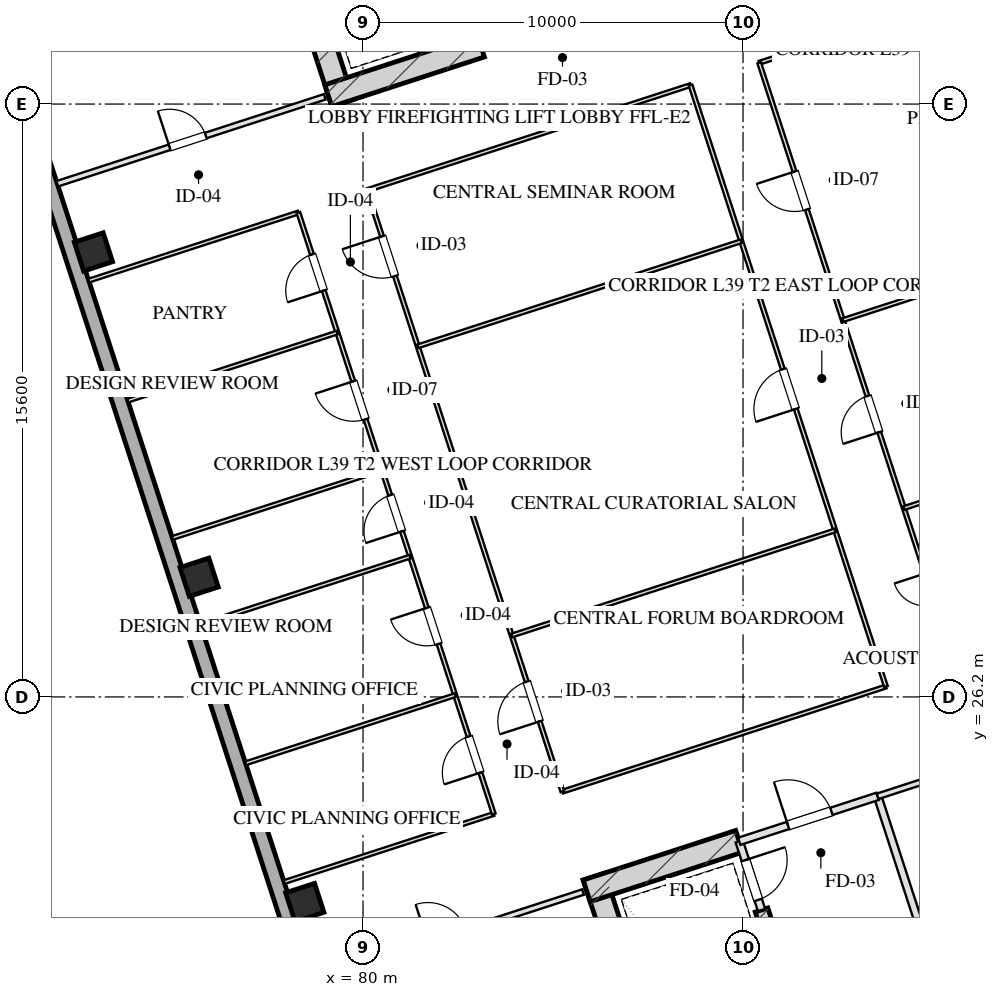
"""IFC4 building model, lengths in metres.
Left out: names, types, materials, properties, quantities, classifications, styles, units other than length and angle.
Written with IfcOpenShell. Run it as: python <this file> out.ifc"""

import sys

from ifc_helpers import new_model, si_unit, direction, frame, frame_2d, origin, origin_2d, place, context, subcontext, project, spatial, rectangle, hollow_rectangle, extrude, element, fill, save


model = new_model("IFC4")
c1 = context("Model", 3, precision=1e-05, world=origin(), true_north=direction((0.0, 1.0)))
c2 = subcontext(c1, "Body", "Model", "MODEL_VIEW")
j1 = project(units=[si_unit("LENGTHUNIT", "METRE"), si_unit("PLANEANGLEUNIT", "RADIAN")], contexts=[c1])
p1 = place(None, origin())
s1 = spatial("IfcSite", under=j1, at=p1, CompositionType="ELEMENT")
p2 = place(p1, origin())
s2 = spatial("IfcBuilding", under=s1, at=p2, CompositionType="ELEMENT")
p3 = place(p2, frame((0.0, 0.0, 149.5)))
s3 = spatial("IfcBuildingStorey", under=s2, at=p3, CompositionType="ELEMENT", Elevation=149.5)
p4 = place(p3, frame((86.078, 21.475, 0.0), z_axis=(0.0, 0.0, 1.0), x_axis=(0.309017938678, -0.951056209472, 0.0)))
e1 = element("IfcWall", 1, at=p4, inside=s3, PredefinedType="SHEAR", context=c2, shape_type="SweptSolid", body=[
    extrude(rectangle(XDim=9.48, YDim=0.6, at=frame_2d((4.74, 0.0))), origin(), (0.0, 0.0, 1.0), 3.45),
])
p5 = place(p3, frame((90.486, 20.594, 0.0), z_axis=(0.0, 0.0, 1.0), x_axis=(0.309020428229, -0.951055400562, 0.0)))
e2 = element("IfcWall", 2, at=p5, inside=s3, PredefinedType="SHEAR", context=c2, shape_type="SweptSolid", body=[
    extrude(rectangle(XDim=6.98, YDim=0.35, at=frame_2d((3.49, 0.0))), origin(), (0.0, 0.0, 1.0), 3.45),
])
p6 = place(p3, frame((85.886, 21.097, 0.0), z_axis=(0.0, 0.0, 1.0), x_axis=(0.951068073652, 0.308981422225, 0.0)))
e3 = element("IfcWall", 3, at=p6, inside=s3, PredefinedType="SHEAR", context=c2, shape_type="SweptSolid", body=[
    extrude(rectangle(XDim=4.22, YDim=0.6, at=frame_2d((2.11, 0.0))), origin(), (0.0, 0.0, 1.0), 3.45),
])
p7 = place(p3, frame((79.466, 41.828, 0.0), z_axis=(0.0, 0.0, 1.0), x_axis=(-0.309041232772, 0.951048640421, 0.0)))
e4 = element("IfcWall", 4, at=p7, inside=s3, PredefinedType="SHEAR", context=c2, shape_type="SweptSolid", body=[
    extrude(rectangle(XDim=9.48, YDim=0.6, at=frame_2d((4.74, 0.0))), origin(), (0.0, 0.0, 1.0), 3.45),
])
p8 = place(p3, frame((79.087, 42.021, 0.0), z_axis=(0.0, 0.0, 1.0), x_axis=(0.951062550203, 0.3089984233, 0.0)))
e5 = element("IfcWall", 5, at=p8, inside=s3, PredefinedType="SHEAR", context=c2, shape_type="SweptSolid", body=[
    extrude(rectangle(XDim=4.22, YDim=0.6, at=frame_2d((2.11, 0.0))), origin(), (0.0, 0.0, 1.0), 3.45),
])
for number, where, z_axis, x_axis in (
    (6, (78.468, 20.79, 0.0), (0.0, 0.0, 1.0), (0.951, 0.309, 0.0)),
    (7, (75.687, 29.349, 0.0), (0.0, 0.0, 1.0), (0.951, 0.309, 0.0)),
    (8, (72.906, 37.909, 0.0), (0.0, 0.0, 1.0), (0.951, 0.309, 0.0)),
):
    element("IfcColumn", number, at=place(p3, frame(where, z_axis=z_axis, x_axis=x_axis)), inside=s3, PredefinedType="COLUMN", context=c2, shape_type="SweptSolid", body=[
        extrude(hollow_rectangle(XDim=0.8, YDim=0.8, WallThickness=0.028, at=origin_2d()), origin(), (0.0, 0.0, 1.0), 3.451),
    ])
p9 = place(p3, frame((81.776, 8.827, 0.0), z_axis=(0.0, 0.0, 1.0), x_axis=(-0.309014228706, 0.951057414911, 0.0)))
e9 = element("IfcWall", 9, at=p9, inside=s3, PredefinedType="SOLIDWALL", context=c2, shape_type="SweptSolid", body=[
    extrude(rectangle(XDim=42.8, YDim=0.4, at=frame_2d((21.4, 0.0))), origin(), (0.0, 0.0, 1.0), 2.61),
])
p10 = place(p3, frame((89.899, 22.401, 0.0), z_axis=(0.0, 0.0, 1.0), x_axis=(0.308932062672, -0.951084108086, 0.0)))
e10 = element("IfcWall", 10, at=p10, inside=s3, PredefinedType="PARTITIONING", context=c2, shape_type="SweptSolid", body=[
    extrude(rectangle(XDim=1.9, YDim=0.2, at=frame_2d((0.95, 0.0))), origin(), (0.0, 0.0, 1.0), 3.175),
])
p11 = place(p10, frame((0.52, 0.0, 0.0)))
e11 = element("IfcOpeningElement", 11, at=p11, cuts=e10, PredefinedType="OPENING", context=c2, shape_type="SweptSolid", body=[
    extrude(rectangle(XDim=1.1, YDim=2.05, at=frame_2d((0.55, 1.025))), frame((0.0, 0.11, 0.0), z_axis=(0.0, -1.0, 0.0), x_axis=(1.0, 0.0, 0.0)), (0.0, 0.0, 1.0), 0.22),
])
p12 = place(p3, frame((93.542, 23.585, 0.0), z_axis=(0.0, 0.0, 1.0), x_axis=(0.309042196757, -0.951048327176, 0.0)))
e12 = element("IfcWall", 12, at=p12, inside=s3, PredefinedType="PARTITIONING", context=c2, shape_type="SweptSolid", body=[
    extrude(rectangle(XDim=8.43, YDim=0.2, at=frame_2d((4.215, 0.0))), origin(), (0.0, 0.0, 1.0), 3.175),
])
p13 = place(p3, frame((89.899, 22.401, 0.0), z_axis=(0.0, 0.0, 1.0), x_axis=(0.951046716504, 0.309047153403, 0.0)))
e13 = element("IfcWall", 13, at=p13, inside=s3, PredefinedType="PARTITIONING", context=c2, shape_type="SweptSolid", body=[
    extrude(rectangle(XDim=3.83, YDim=0.2, at=frame_2d((1.915, 0.0))), origin(), (0.0, 0.0, 1.0), 3.175),
])
p14 = place(p13, frame((1.35, 0.0, 0.0)))
e14 = element("IfcOpeningElement", 14, at=p14, cuts=e13, PredefinedType="OPENING", context=c2, shape_type="SweptSolid", body=[
    extrude(rectangle(XDim=1.2, YDim=2.05, at=frame_2d((0.6, 1.025))), frame((0.0, 0.11, 0.0), z_axis=(0.0, -1.0, 0.0), x_axis=(1.0, 0.0, 0.0)), (0.0, 0.0, 1.0), 0.22),
])
p15 = place(p3, frame((93.542, 23.585, 0.0), z_axis=(0.0, 0.0, 1.0), x_axis=(0.951063829732, 0.308994485023, 0.0)))
e15 = element("IfcWall", 15, at=p15, inside=s3, PredefinedType="PARTITIONING", context=c2, shape_type="SweptSolid", body=[
    extrude(rectangle(XDim=4.4, YDim=0.15, at=frame_2d((2.2, 0.0))), origin(), (0.0, 0.0, 1.0), 3.175),
])
p16 = place(p15, frame((1.5, 0.0, 0.0)))
e16 = element("IfcOpeningElement", 16, at=p16, cuts=e15, PredefinedType="OPENING", context=c2, shape_type="SweptSolid", body=[
    extrude(rectangle(XDim=1.0, YDim=2.05, at=frame_2d((0.5, 1.025))), frame((0.0, 0.085, 0.0), z_axis=(0.0, -1.0, 0.0), x_axis=(1.0, 0.0, 0.0)), (0.0, 0.0, 1.0), 0.17),
])
p17 = place(p3, frame((78.753, 18.78, 0.0), z_axis=(0.0, 0.0, 1.0), x_axis=(0.951060977215, 0.309003264738, 0.0)))
e17 = element("IfcWall", 17, at=p17, inside=s3, PredefinedType="PARTITIONING", context=c2, shape_type="SweptSolid", body=[
    extrude(rectangle(XDim=7.4, YDim=0.15, at=frame_2d((3.7, 0.0))), origin(), (0.0, 0.0, 1.0), 3.175),
])
p18 = place(p17, frame((3.108, 0.0, 0.0)))
e18 = element("IfcOpeningElement", 18, at=p18, cuts=e17, PredefinedType="OPENING", context=c2, shape_type="SweptSolid", body=[
    extrude(rectangle(XDim=1.05, YDim=2.05, at=frame_2d((0.525, 1.025))), frame((0.0, 0.085, 0.0), z_axis=(0.0, -1.0, 0.0), x_axis=(1.0, 0.0, 0.0)), (0.0, 0.0, 1.0), 0.17),
])
p19 = place(p3, frame((71.955, 39.703, 0.0), z_axis=(0.0, 0.0, 1.0), x_axis=(0.951060977215, 0.309003264738, 0.0)))
e19 = element("IfcWall", 19, at=p19, inside=s3, PredefinedType="PARTITIONING", context=c2, shape_type="SweptSolid", body=[
    extrude(rectangle(XDim=7.4, YDim=0.15, at=frame_2d((3.7, 0.0))), origin(), (0.0, 0.0, 1.0), 3.175),
])
p20 = place(p19, frame((3.108, 0.0, 0.0)))
e20 = element("IfcOpeningElement", 20, at=p20, cuts=e19, PredefinedType="OPENING", context=c2, shape_type="SweptSolid", body=[
    extrude(rectangle(XDim=1.0, YDim=2.05, at=frame_2d((0.5, 1.025))), frame((0.0, 0.085, 0.0), z_axis=(0.0, -1.0, 0.0), x_axis=(1.0, 0.0, 0.0)), (0.0, 0.0, 1.0), 0.17),
])
p21 = place(p3, frame((77.925, 21.328, 0.0), z_axis=(0.0, 0.0, 1.0), x_axis=(0.951059431056, 0.309008023519, 0.0)))
e21 = element("IfcWall", 21, at=p21, inside=s3, PredefinedType="MOVABLE", context=c2, shape_type="SweptSolid", body=[
    extrude(rectangle(XDim=5.8, YDim=0.1, at=frame_2d((2.9, 0.0))), origin(), (0.0, 0.0, 1.0), 3.175),
])
p22 = place(p3, frame((85.248, 23.708, 0.0), z_axis=(0.0, 0.0, 1.0), x_axis=(0.951059123431, 0.309008970321, 0.0)))
e22 = element("IfcWall", 22, at=p22, inside=s3, PredefinedType="MOVABLE", context=c2, shape_type="SweptSolid", body=[
    extrude(rectangle(XDim=8.95, YDim=0.1, at=frame_2d((4.475, 0.0))), origin(), (0.0, 0.0, 1.0), 3.175),
])
p23 = place(p3, frame((72.783, 37.154, 0.0), z_axis=(0.0, 0.0, 1.0), x_axis=(0.951047059821, 0.309046096893, 0.0)))
e23 = element("IfcWall", 23, at=p23, inside=s3, PredefinedType="MOVABLE", context=c2, shape_type="SweptSolid", body=[
    extrude(rectangle(XDim=5.8, YDim=0.1, at=frame_2d((2.9, 0.0))), origin(), (0.0, 0.0, 1.0), 3.175),
])
p24 = place(p3, frame((80.106, 39.533, 0.0), z_axis=(0.0, 0.0, 1.0), x_axis=(0.951059123431, 0.309008970321, 0.0)))
e24 = element("IfcWall", 24, at=p24, inside=s3, PredefinedType="MOVABLE", context=c2, shape_type="SweptSolid", body=[
    extrude(rectangle(XDim=8.95, YDim=0.1, at=frame_2d((4.475, 0.0))), origin(), (0.0, 0.0, 1.0), 3.175),
])
p25 = place(p3, frame((90.425, 42.886, 0.0), z_axis=(0.0, 0.0, 1.0), x_axis=(0.95105749975, 0.309013967595, 0.0)))
e25 = element("IfcWall", 25, at=p25, inside=s3, PredefinedType="MOVABLE", context=c2, shape_type="SweptSolid", body=[
    extrude(rectangle(XDim=12.25, YDim=0.1, at=frame_2d((6.125, 0.0))), origin(), (0.0, 0.0, 1.0), 3.175),
])
p26 = place(p3, frame((83.441, 23.121, 0.0), z_axis=(0.0, 0.0, 1.0), x_axis=(-0.30901773025, 0.951056277195, 0.0)))
e26 = element("IfcWall", 26, at=p26, inside=s3, PredefinedType="MOVABLE", context=c2, shape_type="SweptSolid", body=[
    extrude(rectangle(XDim=16.64, YDim=0.1, at=frame_2d((8.32, 0.0))), origin(), (0.0, 0.0, 1.0), 3.175),
])
p27 = place(p26, frame((1.143, 0.0, 0.0)))
e27 = element("IfcOpeningElement", 27, at=p27, cuts=e26, PredefinedType="OPENING", context=c2, shape_type="SweptSolid", body=[
    extrude(rectangle(XDim=1.0, YDim=2.05, at=frame_2d((0.5, 1.025))), frame((0.0, 0.06, 0.0), z_axis=(0.0, -1.0, 0.0), x_axis=(1.0, 0.0, 0.0)), (0.0, 0.0, 1.0), 0.12),
])
p28 = place(p26, frame((4.703, 0.0, 0.0)))
e28 = element("IfcOpeningElement", 28, at=p28, cuts=e26, PredefinedType="OPENING", context=c2, shape_type="SweptSolid", body=[
    extrude(rectangle(XDim=1.0, YDim=2.05, at=frame_2d((0.5, 1.025))), frame((0.0, 0.06, 0.0), z_axis=(0.0, -1.0, 0.0), x_axis=(1.0, 0.0, 0.0)), (0.0, 0.0, 1.0), 0.12),
])
p29 = place(p26, frame((7.82, 0.0, 0.0)))
e29 = element("IfcOpeningElement", 29, at=p29, cuts=e26, PredefinedType="OPENING", context=c2, shape_type="SweptSolid", body=[
    extrude(rectangle(XDim=1.0, YDim=2.05, at=frame_2d((0.5, 1.025))), frame((0.0, 0.06, 0.0), z_axis=(0.0, -1.0, 0.0), x_axis=(1.0, 0.0, 0.0)), (0.0, 0.0, 1.0), 0.12),
])
p30 = place(p26, frame((10.92, 0.0, 0.0)))
e30 = element("IfcOpeningElement", 30, at=p30, cuts=e26, PredefinedType="OPENING", context=c2, shape_type="SweptSolid", body=[
    extrude(rectangle(XDim=1.05, YDim=2.05, at=frame_2d((0.525, 1.025))), frame((0.0, 0.06, 0.0), z_axis=(0.0, -1.0, 0.0), x_axis=(1.0, 0.0, 0.0)), (0.0, 0.0, 1.0), 0.12),
])
p31 = place(p26, frame((14.48, 0.0, 0.0)))
e31 = element("IfcOpeningElement", 31, at=p31, cuts=e26, PredefinedType="OPENING", context=c2, shape_type="SweptSolid", body=[
    extrude(rectangle(XDim=1.0, YDim=2.05, at=frame_2d((0.5, 1.025))), frame((0.0, 0.06, 0.0), z_axis=(0.0, -1.0, 0.0), x_axis=(1.0, 0.0, 0.0)), (0.0, 0.0, 1.0), 0.12),
])
p32 = place(p3, frame((85.248, 23.708, 0.0), z_axis=(0.0, 0.0, 1.0), x_axis=(-0.309004459387, 0.951060589068, 0.0)))
e32 = element("IfcWall", 32, at=p32, inside=s3, PredefinedType="MOVABLE", context=c2, shape_type="SweptSolid", body=[
    extrude(rectangle(XDim=16.64, YDim=0.1, at=frame_2d((8.32, 0.0))), origin(), (0.0, 0.0, 1.0), 3.175),
])
p33 = place(p32, frame((1.944, 0.0, 0.0)))
e33 = element("IfcOpeningElement", 33, at=p33, cuts=e32, PredefinedType="OPENING", context=c2, shape_type="SweptSolid", body=[
    extrude(rectangle(XDim=1.1, YDim=2.05, at=frame_2d((0.55, 1.025))), frame((0.0, 0.06, 0.0), z_axis=(0.0, -1.0, 0.0), x_axis=(1.0, 0.0, 0.0)), (0.0, 0.0, 1.0), 0.12),
])
p34 = place(p32, frame((14.264, 0.0, 0.0)))
e34 = element("IfcOpeningElement", 34, at=p34, cuts=e32, PredefinedType="OPENING", context=c2, shape_type="SweptSolid", body=[
    extrude(rectangle(XDim=1.1, YDim=2.05, at=frame_2d((0.55, 1.025))), frame((0.0, 0.06, 0.0), z_axis=(0.0, -1.0, 0.0), x_axis=(1.0, 0.0, 0.0)), (0.0, 0.0, 1.0), 0.12),
])
p35 = place(p3, frame((93.76, 26.473, 0.0), z_axis=(0.0, 0.0, 1.0), x_axis=(-0.309004459387, 0.951060589068, 0.0)))
e35 = element("IfcWall", 35, at=p35, inside=s3, PredefinedType="MOVABLE", context=c2, shape_type="SweptSolid", body=[
    extrude(rectangle(XDim=16.64, YDim=0.1, at=frame_2d((8.32, 0.0))), origin(), (0.0, 0.0, 1.0), 3.175),
])
p36 = place(p35, frame((7.68, 0.0, 0.0)))
e36 = element("IfcOpeningElement", 36, at=p36, cuts=e35, PredefinedType="OPENING", context=c2, shape_type="SweptSolid", body=[
    extrude(rectangle(XDim=1.1, YDim=2.05, at=frame_2d((0.55, 1.025))), frame((0.0, 0.06, 0.0), z_axis=(0.0, -1.0, 0.0), x_axis=(1.0, 0.0, 0.0)), (0.0, 0.0, 1.0), 0.12),
])
p37 = place(p3, frame((95.567, 27.061, 0.0), z_axis=(0.0, 0.0, 1.0), x_axis=(-0.30901773025, 0.951056277195, 0.0)))
e37 = element("IfcWall", 37, at=p37, inside=s3, PredefinedType="MOVABLE", context=c2, shape_type="SweptSolid", body=[
    extrude(rectangle(XDim=16.64, YDim=0.1, at=frame_2d((8.32, 0.0))), origin(), (0.0, 0.0, 1.0), 3.175),
])
p38 = place(p37, frame((1.66, 0.0, 0.0)))
e38 = element("IfcOpeningElement", 38, at=p38, cuts=e37, PredefinedType="OPENING", context=c2, shape_type="SweptSolid", body=[
    extrude(rectangle(XDim=0.85, YDim=2.05, at=frame_2d((0.425, 1.025))), frame((0.0, 0.06, 0.0), z_axis=(0.0, -1.0, 0.0), x_axis=(1.0, 0.0, 0.0)), (0.0, 0.0, 1.0), 0.12),
])
p39 = place(p37, frame((6.42, 0.0, 0.0)))
e39 = element("IfcOpeningElement", 39, at=p39, cuts=e37, PredefinedType="OPENING", context=c2, shape_type="SweptSolid", body=[
    extrude(rectangle(XDim=1.0, YDim=2.05, at=frame_2d((0.5, 1.025))), frame((0.0, 0.06, 0.0), z_axis=(0.0, -1.0, 0.0), x_axis=(1.0, 0.0, 0.0)), (0.0, 0.0, 1.0), 0.12),
])
p40 = place(p37, frame((12.58, 0.0, 0.0)))
e40 = element("IfcOpeningElement", 40, at=p40, cuts=e37, PredefinedType="OPENING", context=c2, shape_type="SweptSolid", body=[
    extrude(rectangle(XDim=1.05, YDim=2.05, at=frame_2d((0.525, 1.025))), frame((0.0, 0.06, 0.0), z_axis=(0.0, -1.0, 0.0), x_axis=(1.0, 0.0, 0.0)), (0.0, 0.0, 1.0), 0.12),
])
p41 = place(p3, frame((83.913, 27.816, 0.0), z_axis=(0.0, 0.0, 1.0), x_axis=(0.951059123431, 0.309008970321, 0.0)))
e41 = element("IfcWall", 41, at=p41, inside=s3, PredefinedType="MOVABLE", context=c2, shape_type="SweptSolid", body=[
    extrude(rectangle(XDim=8.95, YDim=0.1, at=frame_2d((4.475, 0.0))), origin(), (0.0, 0.0, 1.0), 3.175),
])
p42 = place(p3, frame((81.441, 35.425, 0.0), z_axis=(0.0, 0.0, 1.0), x_axis=(0.951056518616, 0.309016987233, 0.0)))
e42 = element("IfcWall", 42, at=p42, inside=s3, PredefinedType="MOVABLE", context=c2, shape_type="SweptSolid", body=[
    extrude(rectangle(XDim=8.95, YDim=0.1, at=frame_2d((4.475, 0.0))), origin(), (0.0, 0.0, 1.0), 3.175),
])
for number, where, z_axis, x_axis in (
    (43, (76.909, 24.454, 0.0), (0.0, 0.0, 1.0), (0.951, 0.309, 0.0)),
    (44, (75.725, 28.1, 0.0), (0.0, 0.0, 1.0), (0.951, 0.309, 0.0)),
    (45, (74.983, 30.382, 0.0), (0.0, 0.0, 1.0), (0.951, 0.309, 0.0)),
    (46, (73.809, 33.996, 0.0), (0.0, 0.0, 1.0), (0.951, 0.309, 0.0)),
):
    element("IfcWall", number, at=place(p3, frame(where, z_axis=z_axis, x_axis=x_axis)), inside=s3, PredefinedType="MOVABLE", context=c2, shape_type="SweptSolid", body=[
        extrude(rectangle(XDim=5.8, YDim=0.1, at=frame_2d((2.9, 0.0))), origin(), (0.0, 0.0, 1.0), 3.175),
    ])
for number, where, z_axis, x_axis in (
    (47, (94.232, 31.169, 0.0), (0.0, 0.0, 1.0), (0.951, 0.309, 0.0)),
    (48, (92.625, 36.115, 0.0), (0.0, 0.0, 1.0), (0.951, 0.309, 0.0)),
):
    element("IfcWall", number, at=place(p3, frame(where, z_axis=z_axis, x_axis=x_axis)), inside=s3, PredefinedType="MOVABLE", context=c2, shape_type="SweptSolid", body=[
        extrude(rectangle(XDim=12.25, YDim=0.1, at=frame_2d((6.125, 0.0))), origin(), (0.0, 0.0, 1.0), 3.175),
    ])
p43 = place(p11, origin())
e49 = element("IfcDoor", 49, at=p43, inside=s3, OperationType="SINGLE_SWING_LEFT", PredefinedType="DOOR", context=c2, shape_type="SweptSolid", body=[
    extrude(rectangle(XDim=1.1, YDim=2.05, at=frame_2d((0.55, 1.025))), frame((0.0, 0.025, 0.0), z_axis=(0.0, -1.0, 0.0), x_axis=(1.0, 0.0, 0.0)), (0.0, 0.0, 1.0), 0.05),
])
fill(e11, e49)
p44 = place(p14, origin())
e50 = element("IfcDoor", 50, at=p44, inside=s3, OperationType="SINGLE_SWING_LEFT", PredefinedType="DOOR", context=c2, shape_type="SweptSolid", body=[
    extrude(rectangle(XDim=1.2, YDim=2.05, at=frame_2d((0.6, 1.025))), frame((0.0, 0.025, 0.0), z_axis=(0.0, -1.0, 0.0), x_axis=(1.0, 0.0, 0.0)), (0.0, 0.0, 1.0), 0.05),
])
fill(e14, e50)
p45 = place(p20, origin())
e51 = element("IfcDoor", 51, at=p45, inside=s3, OperationType="SINGLE_SWING_LEFT", PredefinedType="DOOR", context=c2, shape_type="SweptSolid", body=[
    extrude(rectangle(XDim=1.0, YDim=2.05, at=frame_2d((0.5, 1.025))), frame((0.0, 0.025, 0.0), z_axis=(0.0, -1.0, 0.0), x_axis=(1.0, 0.0, 0.0)), (0.0, 0.0, 1.0), 0.05),
])
fill(e20, e51)
p46 = place(p27, origin())
e52 = element("IfcDoor", 52, at=p46, inside=s3, OperationType="SINGLE_SWING_LEFT", PredefinedType="DOOR", context=c2, shape_type="SweptSolid", body=[
    extrude(rectangle(XDim=1.0, YDim=2.05, at=frame_2d((0.5, 1.025))), frame((0.0, 0.025, 0.0), z_axis=(0.0, -1.0, 0.0), x_axis=(1.0, 0.0, 0.0)), (0.0, 0.0, 1.0), 0.05),
])
fill(e27, e52)
p47 = place(p28, origin())
e53 = element("IfcDoor", 53, at=p47, inside=s3, OperationType="SINGLE_SWING_RIGHT", PredefinedType="DOOR", context=c2, shape_type="SweptSolid", body=[
    extrude(rectangle(XDim=1.0, YDim=2.05, at=frame_2d((0.5, 1.025))), frame((0.0, 0.025, 0.0), z_axis=(0.0, -1.0, 0.0), x_axis=(1.0, 0.0, 0.0)), (0.0, 0.0, 1.0), 0.05),
])
fill(e28, e53)
p48 = place(p29, origin())
e54 = element("IfcDoor", 54, at=p48, inside=s3, OperationType="SINGLE_SWING_LEFT", PredefinedType="DOOR", context=c2, shape_type="SweptSolid", body=[
    extrude(rectangle(XDim=1.0, YDim=2.05, at=frame_2d((0.5, 1.025))), frame((0.0, 0.025, 0.0), z_axis=(0.0, -1.0, 0.0), x_axis=(1.0, 0.0, 0.0)), (0.0, 0.0, 1.0), 0.05),
])
fill(e29, e54)
p49 = place(p30, origin())
e55 = element("IfcDoor", 55, at=p49, inside=s3, OperationType="SINGLE_SWING_RIGHT", PredefinedType="DOOR", context=c2, shape_type="SweptSolid", body=[
    extrude(rectangle(XDim=1.05, YDim=2.05, at=frame_2d((0.525, 1.025))), frame((0.0, 0.025, 0.0), z_axis=(0.0, -1.0, 0.0), x_axis=(1.0, 0.0, 0.0)), (0.0, 0.0, 1.0), 0.05),
])
fill(e30, e55)
p50 = place(p31, origin())
e56 = element("IfcDoor", 56, at=p50, inside=s3, OperationType="SINGLE_SWING_LEFT", PredefinedType="DOOR", context=c2, shape_type="SweptSolid", body=[
    extrude(rectangle(XDim=1.0, YDim=2.05, at=frame_2d((0.5, 1.025))), frame((0.0, 0.025, 0.0), z_axis=(0.0, -1.0, 0.0), x_axis=(1.0, 0.0, 0.0)), (0.0, 0.0, 1.0), 0.05),
])
fill(e31, e56)
p51 = place(p33, origin())
e57 = element("IfcDoor", 57, at=p51, inside=s3, OperationType="SINGLE_SWING_LEFT", PredefinedType="DOOR", context=c2, shape_type="SweptSolid", body=[
    extrude(rectangle(XDim=1.1, YDim=2.05, at=frame_2d((0.55, 1.025))), frame((0.0, 0.025, 0.0), z_axis=(0.0, -1.0, 0.0), x_axis=(1.0, 0.0, 0.0)), (0.0, 0.0, 1.0), 0.05),
])
fill(e33, e57)
p52 = place(p34, origin())
e58 = element("IfcDoor", 58, at=p52, inside=s3, OperationType="SINGLE_SWING_RIGHT", PredefinedType="DOOR", context=c2, shape_type="SweptSolid", body=[
    extrude(rectangle(XDim=1.1, YDim=2.05, at=frame_2d((0.55, 1.025))), frame((0.0, 0.025, 0.0), z_axis=(0.0, -1.0, 0.0), x_axis=(1.0, 0.0, 0.0)), (0.0, 0.0, 1.0), 0.05),
])
fill(e34, e58)
p53 = place(p36, origin())
e59 = element("IfcDoor", 59, at=p53, inside=s3, OperationType="SINGLE_SWING_LEFT", PredefinedType="DOOR", context=c2, shape_type="SweptSolid", body=[
    extrude(rectangle(XDim=1.1, YDim=2.05, at=frame_2d((0.55, 1.025))), frame((0.0, 0.025, 0.0), z_axis=(0.0, -1.0, 0.0), x_axis=(1.0, 0.0, 0.0)), (0.0, 0.0, 1.0), 0.05),
])
fill(e36, e59)
p54 = place(p39, origin())
e60 = element("IfcDoor", 60, at=p54, inside=s3, OperationType="SINGLE_SWING_LEFT", PredefinedType="DOOR", context=c2, shape_type="SweptSolid", body=[
    extrude(rectangle(XDim=1.0, YDim=2.05, at=frame_2d((0.5, 1.025))), frame((0.0, 0.025, 0.0), z_axis=(0.0, -1.0, 0.0), x_axis=(1.0, 0.0, 0.0)), (0.0, 0.0, 1.0), 0.05),
])
fill(e39, e60)
p55 = place(p40, origin())
e61 = element("IfcDoor", 61, at=p55, inside=s3, OperationType="SINGLE_SWING_RIGHT", PredefinedType="DOOR", context=c2, shape_type="SweptSolid", body=[
    extrude(rectangle(XDim=1.05, YDim=2.05, at=frame_2d((0.525, 1.025))), frame((0.0, 0.025, 0.0), z_axis=(0.0, -1.0, 0.0), x_axis=(1.0, 0.0, 0.0)), (0.0, 0.0, 1.0), 0.05),
])
fill(e40, e61)
save(model, sys.argv[1])
